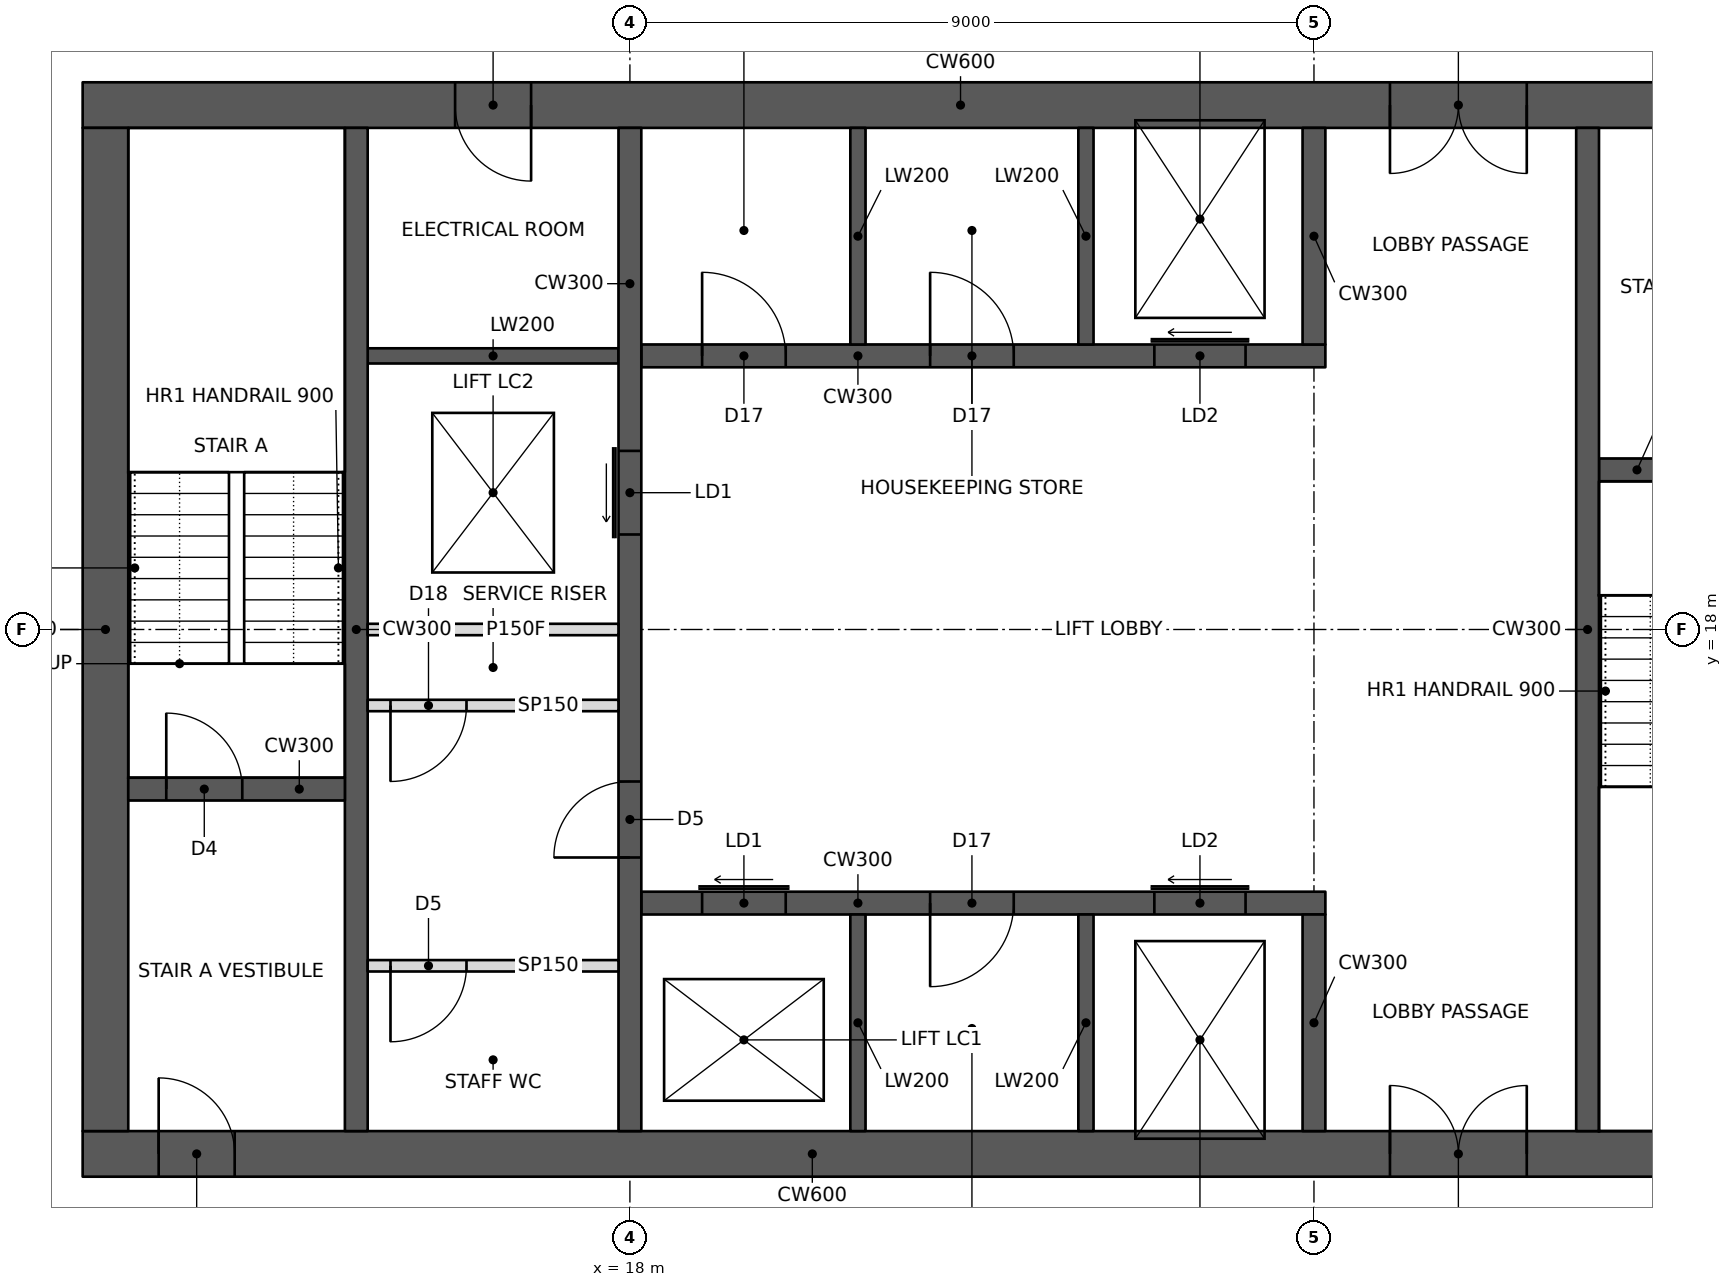
"""IFC4 building model, lengths in metres.
Left out: names, types, materials, properties, quantities, classifications, styles, units other than length and angle.
Written with IfcOpenShell. Run it as: python <this file> out.ifc"""

import sys

from ifc_helpers import new_model, si_unit, direction, frame, frame_2d, origin, place, context, subcontext, project, spatial, rectangle, extrude, element, fill, save


model = new_model("IFC4")
c1 = context("Model", 3, precision=1e-05, world=origin(), true_north=direction((0.0, 1.0)))
c2 = subcontext(c1, "Body", "Model", "MODEL_VIEW")
j1 = project(units=[si_unit("LENGTHUNIT", "METRE"), si_unit("PLANEANGLEUNIT", "RADIAN")], contexts=[c1])
p1 = place(None, origin())
s1 = spatial("IfcSite", under=j1, at=p1, CompositionType="ELEMENT")
p2 = place(p1, origin())
s2 = spatial("IfcBuilding", under=s1, at=p2, CompositionType="ELEMENT")
p3 = place(p2, frame((0.0, 0.0, 191.0)))
s3 = spatial("IfcBuildingStorey", under=s2, at=p3, CompositionType="ELEMENT", Elevation=191.0)
p4 = place(p3, frame((10.8, 11.1, 0.0), z_axis=(0.0, 0.0, 1.0), x_axis=(1.0, 0.0, 0.0)))
e1 = element("IfcWall", 1, at=p4, inside=s3, PredefinedType="SHEAR", context=c2, shape_type="SweptSolid", body=[
    extrude(rectangle(XDim=23.4, YDim=0.6, at=frame_2d((11.7, 0.0))), origin(), (0.0, 0.0, 1.0), 3.4),
])
p5 = place(p4, frame((1.0, 0.0, 0.0)))
e2 = element("IfcOpeningElement", 2, at=p5, cuts=e1, PredefinedType="OPENING", context=c2, shape_type="SweptSolid", body=[
    extrude(rectangle(XDim=1.0, YDim=2.1, at=frame_2d((0.5, 1.05))), frame((0.0, 0.31, 0.0), z_axis=(0.0, -1.0, 0.0), x_axis=(1.0, 0.0, 0.0)), (0.0, 0.0, 1.0), 0.62),
])
p6 = place(p4, frame((17.2, 0.0, 0.0)))
e3 = element("IfcOpeningElement", 3, at=p6, cuts=e1, PredefinedType="OPENING", context=c2, shape_type="SweptSolid", body=[
    extrude(rectangle(XDim=1.8, YDim=2.1, at=frame_2d((0.9, 1.05))), frame((0.0, 0.31, 0.0), z_axis=(0.0, -1.0, 0.0), x_axis=(1.0, 0.0, 0.0)), (0.0, 0.0, 1.0), 0.62),
])
p7 = place(p3, frame((10.8, 24.9, 0.0), z_axis=(0.0, 0.0, 1.0), x_axis=(1.0, 0.0, 0.0)))
e4 = element("IfcWall", 4, at=p7, inside=s3, PredefinedType="SHEAR", context=c2, shape_type="SweptSolid", body=[
    extrude(rectangle(XDim=23.4, YDim=0.6, at=frame_2d((11.7, 0.0))), origin(), (0.0, 0.0, 1.0), 3.4),
])
p8 = place(p7, frame((17.2, 0.0, 0.0)))
e5 = element("IfcOpeningElement", 5, at=p8, cuts=e4, PredefinedType="OPENING", context=c2, shape_type="SweptSolid", body=[
    extrude(rectangle(XDim=1.8, YDim=2.1, at=frame_2d((0.9, 1.05))), frame((0.0, 0.31, 0.0), z_axis=(0.0, -1.0, 0.0), x_axis=(1.0, 0.0, 0.0)), (0.0, 0.0, 1.0), 0.62),
])
p9 = place(p7, frame((21.1, 0.0, 0.0)))
e6 = element("IfcOpeningElement", 6, at=p9, cuts=e4, PredefinedType="OPENING", context=c2, shape_type="SweptSolid", body=[
    extrude(rectangle(XDim=1.0, YDim=2.1, at=frame_2d((0.5, 1.05))), frame((0.0, 0.31, 0.0), z_axis=(0.0, -1.0, 0.0), x_axis=(1.0, 0.0, 0.0)), (0.0, 0.0, 1.0), 0.62),
])
p10 = place(p7, frame((4.9, 0.0, 0.0)))
e7 = element("IfcOpeningElement", 7, at=p10, cuts=e4, PredefinedType="OPENING", context=c2, shape_type="SweptSolid", body=[
    extrude(rectangle(XDim=1.0, YDim=2.1, at=frame_2d((0.5, 1.05))), frame((0.0, 0.31, 0.0), z_axis=(0.0, -1.0, 0.0), x_axis=(1.0, 0.0, 0.0)), (0.0, 0.0, 1.0), 0.62),
])
p11 = place(p3, frame((11.1, 11.4, 0.0), z_axis=(0.0, 0.0, 1.0), x_axis=(0.0, 1.0, 0.0)))
e8 = element("IfcWall", 8, at=p11, inside=s3, PredefinedType="SHEAR", context=c2, shape_type="SweptSolid", body=[
    extrude(rectangle(XDim=13.2, YDim=0.6, at=frame_2d((6.6, 0.0))), origin(), (0.0, 0.0, 1.0), 3.4),
])
p12 = place(p3, frame((14.4, 11.4, 0.0), z_axis=(0.0, 0.0, 1.0), x_axis=(0.0, 1.0, 0.0)))
e9 = element("IfcWall", 9, at=p12, inside=s3, PredefinedType="SHEAR", context=c2, shape_type="SweptSolid", body=[
    extrude(rectangle(XDim=13.2, YDim=0.3, at=frame_2d((6.6, 0.0))), origin(), (0.0, 0.0, 1.0), 3.4),
])
p13 = place(p3, frame((11.4, 15.9, 0.0), z_axis=(0.0, 0.0, 1.0), x_axis=(1.0, 0.0, 0.0)))
e10 = element("IfcWall", 10, at=p13, inside=s3, PredefinedType="SHEAR", context=c2, shape_type="SweptSolid", body=[
    extrude(rectangle(XDim=2.85, YDim=0.3, at=frame_2d((1.425, 0.0))), origin(), (0.0, 0.0, 1.0), 3.4),
])
p14 = place(p13, frame((0.5, 0.0, 0.0)))
e11 = element("IfcOpeningElement", 11, at=p14, cuts=e10, PredefinedType="OPENING", context=c2, shape_type="SweptSolid", body=[
    extrude(rectangle(XDim=1.0, YDim=2.1, at=frame_2d((0.5, 1.05))), frame((0.0, 0.16, 0.0), z_axis=(0.0, -1.0, 0.0), x_axis=(1.0, 0.0, 0.0)), (0.0, 0.0, 1.0), 0.32),
])
p15 = place(p3, frame((18.0, 11.4, 0.0), z_axis=(0.0, 0.0, 1.0), x_axis=(0.0, 1.0, 0.0)))
e12 = element("IfcWall", 12, at=p15, inside=s3, PredefinedType="SHEAR", context=c2, shape_type="SweptSolid", body=[
    extrude(rectangle(XDim=13.2, YDim=0.3, at=frame_2d((6.6, 0.0))), origin(), (0.0, 0.0, 1.0), 3.4),
])
p16 = place(p15, frame((3.6, 0.0, 0.0)))
e13 = element("IfcOpeningElement", 13, at=p16, cuts=e12, PredefinedType="OPENING", context=c2, shape_type="SweptSolid", body=[
    extrude(rectangle(XDim=1.0, YDim=2.1, at=frame_2d((0.5, 1.05))), frame((0.0, 0.16, 0.0), z_axis=(0.0, -1.0, 0.0), x_axis=(1.0, 0.0, 0.0)), (0.0, 0.0, 1.0), 0.32),
])
p17 = place(p15, frame((7.85, 0.0, 0.0)))
e14 = element("IfcOpeningElement", 14, at=p17, cuts=e12, PredefinedType="OPENING", context=c2, shape_type="SweptSolid", body=[
    extrude(rectangle(XDim=1.1, YDim=2.1, at=frame_2d((0.55, 1.05))), frame((0.0, 0.16, 0.0), z_axis=(0.0, -1.0, 0.0), x_axis=(1.0, 0.0, 0.0)), (0.0, 0.0, 1.0), 0.32),
])
p18 = place(p3, frame((14.55, 18.0, 0.0), z_axis=(0.0, 0.0, 1.0), x_axis=(1.0, 0.0, 0.0)))
e15 = element("IfcWall", 15, at=p18, inside=s3, PredefinedType="PARTITIONING", context=c2, shape_type="SweptSolid", body=[
    extrude(rectangle(XDim=3.3, YDim=0.15, at=frame_2d((1.65, 0.0))), origin(), (0.0, 0.0, 1.0), 3.2),
])
p19 = place(p3, frame((18.15, 14.4, 0.0), z_axis=(0.0, 0.0, 1.0), x_axis=(1.0, 0.0, 0.0)))
e16 = element("IfcWall", 16, at=p19, inside=s3, PredefinedType="SHEAR", context=c2, shape_type="SweptSolid", body=[
    extrude(rectangle(XDim=9.0, YDim=0.3, at=frame_2d((4.5, 0.0))), origin(), (0.0, 0.0, 1.0), 3.4),
])
p20 = place(p19, frame((0.8, 0.0, 0.0)))
e17 = element("IfcOpeningElement", 17, at=p20, cuts=e16, PredefinedType="OPENING", context=c2, shape_type="SweptSolid", body=[
    extrude(rectangle(XDim=1.1, YDim=2.1, at=frame_2d((0.55, 1.05))), frame((0.0, 0.16, 0.0), z_axis=(0.0, -1.0, 0.0), x_axis=(1.0, 0.0, 0.0)), (0.0, 0.0, 1.0), 0.32),
])
p21 = place(p19, frame((6.75, 0.0, 0.0)))
e18 = element("IfcOpeningElement", 18, at=p21, cuts=e16, PredefinedType="OPENING", context=c2, shape_type="SweptSolid", body=[
    extrude(rectangle(XDim=1.2, YDim=2.1, at=frame_2d((0.6, 1.05))), frame((0.0, 0.16, 0.0), z_axis=(0.0, -1.0, 0.0), x_axis=(1.0, 0.0, 0.0)), (0.0, 0.0, 1.0), 0.32),
])
p22 = place(p19, frame((3.8, 0.0, 0.0)))
e19 = element("IfcOpeningElement", 19, at=p22, cuts=e16, PredefinedType="OPENING", context=c2, shape_type="SweptSolid", body=[
    extrude(rectangle(XDim=1.1, YDim=2.1, at=frame_2d((0.55, 1.05))), frame((0.0, 0.16, 0.0), z_axis=(0.0, -1.0, 0.0), x_axis=(1.0, 0.0, 0.0)), (0.0, 0.0, 1.0), 0.32),
])
p23 = place(p3, frame((27.0, 11.4, 0.0), z_axis=(0.0, 0.0, 1.0), x_axis=(0.0, 1.0, 0.0)))
e20 = element("IfcWall", 20, at=p23, inside=s3, PredefinedType="SHEAR", context=c2, shape_type="SweptSolid", body=[
    extrude(rectangle(XDim=2.85, YDim=0.3, at=frame_2d((1.425, 0.0))), origin(), (0.0, 0.0, 1.0), 3.4),
])
for number, where, z_axis, x_axis in (
    (21, (21.0, 11.4, 0.0), (0.0, 0.0, 1.0), (0.0, 1.0, 0.0)),
    (22, (24.0, 11.4, 0.0), (0.0, 0.0, 1.0), (0.0, 1.0, 0.0)),
):
    element("IfcWall", number, at=place(p3, frame(where, z_axis=z_axis, x_axis=x_axis)), inside=s3, PredefinedType="SHEAR", context=c2, shape_type="SweptSolid", body=[
        extrude(rectangle(XDim=2.85, YDim=0.2, at=frame_2d((1.425, 0.0))), origin(), (0.0, 0.0, 1.0), 3.4),
    ])
p24 = place(p3, frame((18.15, 21.6, 0.0), z_axis=(0.0, 0.0, 1.0), x_axis=(1.0, 0.0, 0.0)))
e23 = element("IfcWall", 23, at=p24, inside=s3, PredefinedType="SHEAR", context=c2, shape_type="SweptSolid", body=[
    extrude(rectangle(XDim=9.0, YDim=0.3, at=frame_2d((4.5, 0.0))), origin(), (0.0, 0.0, 1.0), 3.4),
])
p25 = place(p24, frame((6.75, 0.0, 0.0)))
e24 = element("IfcOpeningElement", 24, at=p25, cuts=e23, PredefinedType="OPENING", context=c2, shape_type="SweptSolid", body=[
    extrude(rectangle(XDim=1.2, YDim=2.1, at=frame_2d((0.6, 1.05))), frame((0.0, 0.16, 0.0), z_axis=(0.0, -1.0, 0.0), x_axis=(1.0, 0.0, 0.0)), (0.0, 0.0, 1.0), 0.32),
])
p26 = place(p24, frame((0.8, 0.0, 0.0)))
e25 = element("IfcOpeningElement", 25, at=p26, cuts=e23, PredefinedType="OPENING", context=c2, shape_type="SweptSolid", body=[
    extrude(rectangle(XDim=1.1, YDim=2.1, at=frame_2d((0.55, 1.05))), frame((0.0, 0.16, 0.0), z_axis=(0.0, -1.0, 0.0), x_axis=(1.0, 0.0, 0.0)), (0.0, 0.0, 1.0), 0.32),
])
p27 = place(p24, frame((3.8, 0.0, 0.0)))
e26 = element("IfcOpeningElement", 26, at=p27, cuts=e23, PredefinedType="OPENING", context=c2, shape_type="SweptSolid", body=[
    extrude(rectangle(XDim=1.1, YDim=2.1, at=frame_2d((0.55, 1.05))), frame((0.0, 0.16, 0.0), z_axis=(0.0, -1.0, 0.0), x_axis=(1.0, 0.0, 0.0)), (0.0, 0.0, 1.0), 0.32),
])
p28 = place(p3, frame((27.0, 21.75, 0.0), z_axis=(0.0, 0.0, 1.0), x_axis=(0.0, 1.0, 0.0)))
e27 = element("IfcWall", 27, at=p28, inside=s3, PredefinedType="SHEAR", context=c2, shape_type="SweptSolid", body=[
    extrude(rectangle(XDim=2.85, YDim=0.3, at=frame_2d((1.425, 0.0))), origin(), (0.0, 0.0, 1.0), 3.4),
])
for number, where, z_axis, x_axis in (
    (28, (21.0, 21.75, 0.0), (0.0, 0.0, 1.0), (0.0, 1.0, 0.0)),
    (29, (24.0, 21.75, 0.0), (0.0, 0.0, 1.0), (0.0, 1.0, 0.0)),
):
    element("IfcWall", number, at=place(p3, frame(where, z_axis=z_axis, x_axis=x_axis)), inside=s3, PredefinedType="SHEAR", context=c2, shape_type="SweptSolid", body=[
        extrude(rectangle(XDim=2.85, YDim=0.2, at=frame_2d((1.425, 0.0))), origin(), (0.0, 0.0, 1.0), 3.4),
    ])
p29 = place(p3, frame((30.6, 11.4, 0.0), z_axis=(0.0, 0.0, 1.0), x_axis=(0.0, 1.0, 0.0)))
e30 = element("IfcWall", 30, at=p29, inside=s3, PredefinedType="SHEAR", context=c2, shape_type="SweptSolid", body=[
    extrude(rectangle(XDim=13.2, YDim=0.3, at=frame_2d((6.6, 0.0))), origin(), (0.0, 0.0, 1.0), 3.4),
])
p30 = place(p3, frame((30.75, 20.1, 0.0), z_axis=(0.0, 0.0, 1.0), x_axis=(1.0, 0.0, 0.0)))
e31 = element("IfcWall", 31, at=p30, inside=s3, PredefinedType="SHEAR", context=c2, shape_type="SweptSolid", body=[
    extrude(rectangle(XDim=2.85, YDim=0.3, at=frame_2d((1.425, 0.0))), origin(), (0.0, 0.0, 1.0), 3.4),
])
p31 = place(p30, frame((1.15, 0.0, 0.0)))
e32 = element("IfcOpeningElement", 32, at=p31, cuts=e31, PredefinedType="OPENING", context=c2, shape_type="SweptSolid", body=[
    extrude(rectangle(XDim=1.0, YDim=2.1, at=frame_2d((0.5, 1.05))), frame((0.0, 0.16, 0.0), z_axis=(0.0, -1.0, 0.0), x_axis=(1.0, 0.0, 0.0)), (0.0, 0.0, 1.0), 0.32),
])
p32 = place(p3, frame((14.55, 21.6, 0.0), z_axis=(0.0, 0.0, 1.0), x_axis=(1.0, 0.0, 0.0)))
e33 = element("IfcWall", 33, at=p32, inside=s3, PredefinedType="SHEAR", context=c2, shape_type="SweptSolid", body=[
    extrude(rectangle(XDim=3.3, YDim=0.2, at=frame_2d((1.65, 0.0))), origin(), (0.0, 0.0, 1.0), 3.4),
])
p33 = place(p3, frame((14.55, 17.0, 0.0), z_axis=(0.0, 0.0, 1.0), x_axis=(1.0, 0.0, 0.0)))
e34 = element("IfcWall", 34, at=p33, inside=s3, PredefinedType="PARTITIONING", context=c2, shape_type="SweptSolid", body=[
    extrude(rectangle(XDim=3.3, YDim=0.15, at=frame_2d((1.65, 0.0))), origin(), (0.0, 0.0, 1.0), 3.2),
])
p34 = place(p33, frame((0.3, 0.0, 0.0)))
e35 = element("IfcOpeningElement", 35, at=p34, cuts=e34, PredefinedType="OPENING", context=c2, shape_type="SweptSolid", body=[
    extrude(rectangle(XDim=1.0, YDim=2.1, at=frame_2d((0.5, 1.05))), frame((0.0, 0.085, 0.0), z_axis=(0.0, -1.0, 0.0), x_axis=(1.0, 0.0, 0.0)), (0.0, 0.0, 1.0), 0.17),
])
p35 = place(p3, frame((14.55, 13.575, 0.0), z_axis=(0.0, 0.0, 1.0), x_axis=(1.0, 0.0, 0.0)))
e36 = element("IfcWall", 36, at=p35, inside=s3, PredefinedType="PARTITIONING", context=c2, shape_type="SweptSolid", body=[
    extrude(rectangle(XDim=3.3, YDim=0.15, at=frame_2d((1.65, 0.0))), origin(), (0.0, 0.0, 1.0), 3.2),
])
p36 = place(p35, frame((0.3, 0.0, 0.0)))
e37 = element("IfcOpeningElement", 37, at=p36, cuts=e36, PredefinedType="OPENING", context=c2, shape_type="SweptSolid", body=[
    extrude(rectangle(XDim=1.0, YDim=2.1, at=frame_2d((0.5, 1.05))), frame((0.0, 0.085, 0.0), z_axis=(0.0, -1.0, 0.0), x_axis=(1.0, 0.0, 0.0)), (0.0, 0.0, 1.0), 0.17),
])
p37 = place(p34, frame((1.0, 0.0, 0.0), z_axis=(0.0, 0.0, 1.0), x_axis=(-1.0, 0.0, 0.0)))
e38 = element("IfcDoor", 38, at=p37, inside=s3, OperationType="SINGLE_SWING_RIGHT", PredefinedType="DOOR", context=c2, shape_type="SweptSolid", body=[
    extrude(rectangle(XDim=1.0, YDim=2.1, at=frame_2d((0.5, 1.05))), frame((0.0, 0.025, 0.0), z_axis=(0.0, -1.0, 0.0), x_axis=(1.0, 0.0, 0.0)), (0.0, 0.0, 1.0), 0.05),
])
fill(e35, e38)
p38 = place(p36, frame((1.0, 0.0, 0.0), z_axis=(0.0, 0.0, 1.0), x_axis=(-1.0, 0.0, 0.0)))
e39 = element("IfcDoor", 39, at=p38, inside=s3, OperationType="SINGLE_SWING_RIGHT", PredefinedType="DOOR", context=c2, shape_type="SweptSolid", body=[
    extrude(rectangle(XDim=1.0, YDim=2.1, at=frame_2d((0.5, 1.05))), frame((0.0, 0.025, 0.0), z_axis=(0.0, -1.0, 0.0), x_axis=(1.0, 0.0, 0.0)), (0.0, 0.0, 1.0), 0.05),
])
fill(e37, e39)
p39 = place(p5, origin())
e40 = element("IfcDoor", 40, at=p39, inside=s3, OperationType="SINGLE_SWING_LEFT", PredefinedType="DOOR", context=c2, shape_type="SweptSolid", body=[
    extrude(rectangle(XDim=1.0, YDim=2.1, at=frame_2d((0.5, 1.05))), frame((0.0, 0.025, 0.0), z_axis=(0.0, -1.0, 0.0), x_axis=(1.0, 0.0, 0.0)), (0.0, 0.0, 1.0), 0.05),
])
fill(e2, e40)
p40 = place(p14, origin())
e41 = element("IfcDoor", 41, at=p40, inside=s3, OperationType="SINGLE_SWING_LEFT", PredefinedType="DOOR", context=c2, shape_type="SweptSolid", body=[
    extrude(rectangle(XDim=1.0, YDim=2.1, at=frame_2d((0.5, 1.05))), frame((0.0, 0.025, 0.0), z_axis=(0.0, -1.0, 0.0), x_axis=(1.0, 0.0, 0.0)), (0.0, 0.0, 1.0), 0.05),
])
fill(e11, e41)
p41 = place(p6, origin())
e42 = element("IfcDoor", 42, at=p41, inside=s3, OperationType="DOUBLE_DOOR_SINGLE_SWING", PredefinedType="DOOR", context=c2, shape_type="SweptSolid", body=[
    extrude(rectangle(XDim=1.8, YDim=2.1, at=frame_2d((0.9, 1.05))), frame((0.0, 0.025, 0.0), z_axis=(0.0, -1.0, 0.0), x_axis=(1.0, 0.0, 0.0)), (0.0, 0.0, 1.0), 0.05),
])
fill(e3, e42)
p42 = place(p8, frame((1.8, 0.0, 0.0), z_axis=(0.0, 0.0, 1.0), x_axis=(-1.0, 0.0, 0.0)))
e43 = element("IfcDoor", 43, at=p42, inside=s3, OperationType="DOUBLE_DOOR_SINGLE_SWING", PredefinedType="DOOR", context=c2, shape_type="SweptSolid", body=[
    extrude(rectangle(XDim=1.8, YDim=2.1, at=frame_2d((0.9, 1.05))), frame((0.0, 0.025, 0.0), z_axis=(0.0, -1.0, 0.0), x_axis=(1.0, 0.0, 0.0)), (0.0, 0.0, 1.0), 0.05),
])
fill(e5, e43)
p43 = place(p16, origin())
e44 = element("IfcDoor", 44, at=p43, inside=s3, OperationType="SINGLE_SWING_LEFT", PredefinedType="DOOR", context=c2, shape_type="SweptSolid", body=[
    extrude(rectangle(XDim=1.0, YDim=2.1, at=frame_2d((0.5, 1.05))), frame((0.0, 0.025, 0.0), z_axis=(0.0, -1.0, 0.0), x_axis=(1.0, 0.0, 0.0)), (0.0, 0.0, 1.0), 0.05),
])
fill(e13, e44)
p44 = place(p10, frame((1.0, 0.0, 0.0), z_axis=(0.0, 0.0, 1.0), x_axis=(-1.0, 0.0, 0.0)))
e45 = element("IfcDoor", 45, at=p44, inside=s3, OperationType="SINGLE_SWING_LEFT", PredefinedType="DOOR", context=c2, shape_type="SweptSolid", body=[
    extrude(rectangle(XDim=1.0, YDim=2.1, at=frame_2d((0.5, 1.05))), frame((0.0, 0.025, 0.0), z_axis=(0.0, -1.0, 0.0), x_axis=(1.0, 0.0, 0.0)), (0.0, 0.0, 1.0), 0.05),
])
fill(e7, e45)
p45 = place(p20, origin())
e46 = element("IfcDoor", 46, at=p45, inside=s3, OperationType="SLIDING_TO_LEFT", PredefinedType="DOOR", context=c2, shape_type="SweptSolid", body=[
    extrude(rectangle(XDim=1.1, YDim=2.1, at=frame_2d((0.55, 1.05))), frame((0.0, 0.025, 0.0), z_axis=(0.0, -1.0, 0.0), x_axis=(1.0, 0.0, 0.0)), (0.0, 0.0, 1.0), 0.05),
])
fill(e17, e46)
p46 = place(p17, origin())
e47 = element("IfcDoor", 47, at=p46, inside=s3, OperationType="SLIDING_TO_LEFT", PredefinedType="DOOR", context=c2, shape_type="SweptSolid", body=[
    extrude(rectangle(XDim=1.1, YDim=2.1, at=frame_2d((0.55, 1.05))), frame((0.0, 0.025, 0.0), z_axis=(0.0, -1.0, 0.0), x_axis=(1.0, 0.0, 0.0)), (0.0, 0.0, 1.0), 0.05),
])
fill(e14, e47)
p47 = place(p21, origin())
e48 = element("IfcDoor", 48, at=p47, inside=s3, OperationType="SLIDING_TO_LEFT", PredefinedType="DOOR", context=c2, shape_type="SweptSolid", body=[
    extrude(rectangle(XDim=1.2, YDim=2.1, at=frame_2d((0.6, 1.05))), frame((0.0, 0.025, 0.0), z_axis=(0.0, -1.0, 0.0), x_axis=(1.0, 0.0, 0.0)), (0.0, 0.0, 1.0), 0.05),
])
fill(e18, e48)
p48 = place(p25, origin())
e49 = element("IfcDoor", 49, at=p48, inside=s3, OperationType="SLIDING_TO_LEFT", PredefinedType="DOOR", context=c2, shape_type="SweptSolid", body=[
    extrude(rectangle(XDim=1.2, YDim=2.1, at=frame_2d((0.6, 1.05))), frame((0.0, 0.025, 0.0), z_axis=(0.0, -1.0, 0.0), x_axis=(1.0, 0.0, 0.0)), (0.0, 0.0, 1.0), 0.05),
])
fill(e24, e49)
p49 = place(p26, origin())
e50 = element("IfcDoor", 50, at=p49, inside=s3, OperationType="SINGLE_SWING_LEFT", PredefinedType="DOOR", context=c2, shape_type="SweptSolid", body=[
    extrude(rectangle(XDim=1.1, YDim=2.1, at=frame_2d((0.55, 1.05))), frame((0.0, 0.025, 0.0), z_axis=(0.0, -1.0, 0.0), x_axis=(1.0, 0.0, 0.0)), (0.0, 0.0, 1.0), 0.05),
])
fill(e25, e50)
p50 = place(p27, origin())
e51 = element("IfcDoor", 51, at=p50, inside=s3, OperationType="SINGLE_SWING_LEFT", PredefinedType="DOOR", context=c2, shape_type="SweptSolid", body=[
    extrude(rectangle(XDim=1.1, YDim=2.1, at=frame_2d((0.55, 1.05))), frame((0.0, 0.025, 0.0), z_axis=(0.0, -1.0, 0.0), x_axis=(1.0, 0.0, 0.0)), (0.0, 0.0, 1.0), 0.05),
])
fill(e26, e51)
p51 = place(p22, frame((1.1, 0.0, 0.0), z_axis=(0.0, 0.0, 1.0), x_axis=(-1.0, 0.0, 0.0)))
e52 = element("IfcDoor", 52, at=p51, inside=s3, OperationType="SINGLE_SWING_RIGHT", PredefinedType="DOOR", context=c2, shape_type="SweptSolid", body=[
    extrude(rectangle(XDim=1.1, YDim=2.1, at=frame_2d((0.55, 1.05))), frame((0.0, 0.025, 0.0), z_axis=(0.0, -1.0, 0.0), x_axis=(1.0, 0.0, 0.0)), (0.0, 0.0, 1.0), 0.05),
])
fill(e19, e52)
save(model, sys.argv[1])
